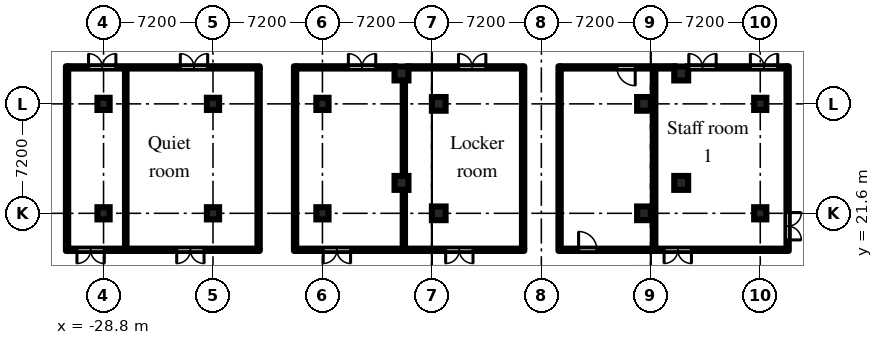
"""IFC4 building model, lengths in metres.
Left out: names, types, materials, properties, quantities, classifications, styles, units other than length and angle.
Written with IfcOpenShell. Run it as: python <this file> out.ifc"""

import sys

from ifc_helpers import new_model, si_unit, direction, frame, frame_2d, origin, origin_2d, place, context, subcontext, project, spatial, rectangle, hollow_circle, extrude, element, fill, save


model = new_model("IFC4")
c1 = context("Model", 3, precision=1e-05, world=origin(), true_north=direction((0.0, 1.0)))
c2 = subcontext(c1, "Body", "Model", "MODEL_VIEW")
j1 = project(units=[si_unit("LENGTHUNIT", "METRE"), si_unit("PLANEANGLEUNIT", "RADIAN")], contexts=[c1])
p1 = place(None, origin())
s1 = spatial("IfcSite", under=j1, at=p1, CompositionType="ELEMENT")
p2 = place(p1, origin())
s2 = spatial("IfcBuilding", under=s1, at=p2, CompositionType="ELEMENT")
p3 = place(p2, origin())
s3 = spatial("IfcBuildingStorey", under=s2, at=p3, CompositionType="ELEMENT", Elevation=0.0)
for number, where, z_axis, x_axis in (
    (1, (-6.75, 21.6, 0.0), (0.0, 0.0, 1.0), (1.0, 0.0, 0.0)),
    (2, (-6.75, 28.8, 0.0), (0.0, 0.0, 1.0), (1.0, 0.0, 0.0)),
    (3, (6.75, 21.6, 0.0), (0.0, 0.0, 1.0), (1.0, 0.0, 0.0)),
    (4, (6.75, 28.8, 0.0), (0.0, 0.0, 1.0), (1.0, 0.0, 0.0)),
):
    element("IfcColumn", number, at=place(p3, frame(where, z_axis=z_axis, x_axis=x_axis)), inside=s3, PredefinedType="COLUMN", context=c2, shape_type="SweptSolid", body=[
        extrude(rectangle(XDim=0.9, YDim=0.9, at=origin_2d()), origin(), (0.0, 0.0, 1.0), 7.2),
    ])
for number, where, z_axis, x_axis in (
    (5, (-28.8, 21.6, 0.0), (0.0, 0.0, 1.0), (1.0, 0.0, 0.0)),
    (6, (-28.8, 28.8, 0.0), (0.0, 0.0, 1.0), (1.0, 0.0, 0.0)),
    (7, (-21.6, 21.6, 0.0), (0.0, 0.0, 1.0), (1.0, 0.0, 0.0)),
    (8, (-21.6, 28.8, 0.0), (0.0, 0.0, 1.0), (1.0, 0.0, 0.0)),
    (9, (-14.4, 21.6, 0.0), (0.0, 0.0, 1.0), (1.0, 0.0, 0.0)),
    (10, (-14.4, 28.8, 0.0), (0.0, 0.0, 1.0), (1.0, 0.0, 0.0)),
    (11, (14.4, 21.6, 0.0), (0.0, 0.0, 1.0), (1.0, 0.0, 0.0)),
    (12, (14.4, 28.8, 0.0), (0.0, 0.0, 1.0), (1.0, 0.0, 0.0)),
):
    element("IfcColumn", number, at=place(p3, frame(where, z_axis=z_axis, x_axis=x_axis)), inside=s3, PredefinedType="COLUMN", context=c2, shape_type="SweptSolid", body=[
        extrude(rectangle(XDim=0.8, YDim=0.8, at=origin_2d()), origin(), (0.0, 0.0, 1.0), 6.6),
    ])
for number, where, z_axis, x_axis in (
    (13, (9.2, 23.6, 0.0), (0.0, 0.0, 1.0), (1.0, 0.0, 0.0)),
    (14, (9.2, 30.8, 0.0), (0.0, 0.0, 1.0), (1.0, 0.0, 0.0)),
    (15, (-9.2, 30.8, 0.0), (0.0, 0.0, 1.0), (1.0, 0.0, 0.0)),
    (16, (-9.2, 23.6, 0.0), (0.0, 0.0, 1.0), (1.0, 0.0, 0.0)),
):
    element("IfcColumn", number, at=place(p3, frame(where, z_axis=z_axis, x_axis=x_axis)), inside=s3, PredefinedType="COLUMN", context=c2, shape_type="SweptSolid", body=[
        extrude(hollow_circle(Radius=0.457, WallThickness=0.05, at=origin_2d()), origin(), (0.0, 0.0, 1.0), 7.5),
    ])
p4 = place(p3, frame((-31.2, 19.125, 0.0), z_axis=(0.0, 0.0, 1.0), x_axis=(0.0, 1.0, 0.0)))
e17 = element("IfcWall", 17, at=p4, inside=s3, PredefinedType="PARTITIONING", context=c2, shape_type="SweptSolid", body=[
    extrude(rectangle(XDim=12.15, YDim=0.15, at=frame_2d((6.075, 0.0))), origin(), (0.0, 0.0, 1.0), 6.6),
])
p5 = place(p3, frame((-31.125, 19.2, 0.0), z_axis=(0.0, 0.0, 1.0), x_axis=(1.0, 0.0, 0.0)))
e18 = element("IfcWall", 18, at=p5, inside=s3, PredefinedType="PARTITIONING", context=c2, shape_type="SweptSolid", body=[
    extrude(rectangle(XDim=12.6, YDim=0.15, at=frame_2d((6.3, 0.0))), origin(), (0.0, 0.0, 1.0), 6.6),
])
p6 = place(p5, frame((0.575, 0.0, 0.0)))
e19 = element("IfcOpeningElement", 19, at=p6, cuts=e18, PredefinedType="OPENING", context=c2, shape_type="SweptSolid", body=[
    extrude(rectangle(XDim=1.8, YDim=2.1, at=frame_2d((0.9, 1.05))), frame((0.0, 0.085, 0.0), z_axis=(0.0, -1.0, 0.0), x_axis=(1.0, 0.0, 0.0)), (0.0, 0.0, 1.0), 0.17),
])
p7 = place(p5, frame((7.137, 0.0, 0.0)))
e20 = element("IfcOpeningElement", 20, at=p7, cuts=e18, PredefinedType="OPENING", context=c2, shape_type="SweptSolid", body=[
    extrude(rectangle(XDim=1.8, YDim=2.1, at=frame_2d((0.9, 1.05))), frame((0.0, 0.085, 0.0), z_axis=(0.0, -1.0, 0.0), x_axis=(1.0, 0.0, 0.0)), (0.0, 0.0, 1.0), 0.17),
])
p8 = place(p3, frame((-31.125, 31.2, 0.0), z_axis=(0.0, 0.0, 1.0), x_axis=(1.0, 0.0, 0.0)))
e21 = element("IfcWall", 21, at=p8, inside=s3, PredefinedType="PARTITIONING", context=c2, shape_type="SweptSolid", body=[
    extrude(rectangle(XDim=12.6, YDim=0.15, at=frame_2d((6.3, 0.0))), origin(), (0.0, 0.0, 1.0), 6.6),
])
p9 = place(p8, frame((1.337, 0.0, 0.0)))
e22 = element("IfcOpeningElement", 22, at=p9, cuts=e21, PredefinedType="OPENING", context=c2, shape_type="SweptSolid", body=[
    extrude(rectangle(XDim=1.8, YDim=2.1, at=frame_2d((0.9, 1.05))), frame((0.0, 0.085, 0.0), z_axis=(0.0, -1.0, 0.0), x_axis=(1.0, 0.0, 0.0)), (0.0, 0.0, 1.0), 0.17),
])
p10 = place(p8, frame((7.375, 0.0, 0.0)))
e23 = element("IfcOpeningElement", 23, at=p10, cuts=e21, PredefinedType="OPENING", context=c2, shape_type="SweptSolid", body=[
    extrude(rectangle(XDim=1.8, YDim=2.1, at=frame_2d((0.9, 1.05))), frame((0.0, 0.085, 0.0), z_axis=(0.0, -1.0, 0.0), x_axis=(1.0, 0.0, 0.0)), (0.0, 0.0, 1.0), 0.17),
])
p11 = place(p3, frame((-27.338, 19.275, 0.0), z_axis=(0.0, 0.0, 1.0), x_axis=(0.0, 1.0, 0.0)))
e24 = element("IfcWall", 24, at=p11, inside=s3, PredefinedType="PARTITIONING", context=c2, shape_type="SweptSolid", body=[
    extrude(rectangle(XDim=11.85, YDim=0.1, at=frame_2d((5.925, 0.0))), origin(), (0.0, 0.0, 1.0), 6.6),
])
p12 = place(p3, frame((-18.6, 19.275, 0.0), z_axis=(0.0, 0.0, 1.0), x_axis=(0.0, 1.0, 0.0)))
e25 = element("IfcWall", 25, at=p12, inside=s3, PredefinedType="PARTITIONING", context=c2, shape_type="SweptSolid", body=[
    extrude(rectangle(XDim=11.85, YDim=0.15, at=frame_2d((5.925, 0.0))), origin(), (0.0, 0.0, 1.0), 6.6),
])
p13 = place(p3, frame((-16.2, 19.125, 0.0), z_axis=(0.0, 0.0, 1.0), x_axis=(0.0, 1.0, 0.0)))
e26 = element("IfcWall", 26, at=p13, inside=s3, PredefinedType="PARTITIONING", context=c2, shape_type="SweptSolid", body=[
    extrude(rectangle(XDim=12.15, YDim=0.15, at=frame_2d((6.075, 0.0))), origin(), (0.0, 0.0, 1.0), 6.6),
])
p14 = place(p3, frame((-16.125, 19.2, 0.0), z_axis=(0.0, 0.0, 1.0), x_axis=(1.0, 0.0, 0.0)))
e27 = element("IfcWall", 27, at=p14, inside=s3, PredefinedType="PARTITIONING", context=c2, shape_type="SweptSolid", body=[
    extrude(rectangle(XDim=15.0, YDim=0.15, at=frame_2d((7.5, 0.0))), origin(), (0.0, 0.0, 1.0), 6.6),
])
p15 = place(p14, frame((1.775, 0.0, 0.0)))
e28 = element("IfcOpeningElement", 28, at=p15, cuts=e27, PredefinedType="OPENING", context=c2, shape_type="SweptSolid", body=[
    extrude(rectangle(XDim=1.8, YDim=2.1, at=frame_2d((0.9, 1.05))), frame((0.0, 0.085, 0.0), z_axis=(0.0, -1.0, 0.0), x_axis=(1.0, 0.0, 0.0)), (0.0, 0.0, 1.0), 0.17),
])
p16 = place(p14, frame((9.83, 0.0, 0.0)))
e29 = element("IfcOpeningElement", 29, at=p16, cuts=e27, PredefinedType="OPENING", context=c2, shape_type="SweptSolid", body=[
    extrude(rectangle(XDim=1.8, YDim=2.1, at=frame_2d((0.9, 1.05))), frame((0.0, 0.085, 0.0), z_axis=(0.0, -1.0, 0.0), x_axis=(1.0, 0.0, 0.0)), (0.0, 0.0, 1.0), 0.17),
])
p17 = place(p3, frame((-16.125, 31.2, 0.0), z_axis=(0.0, 0.0, 1.0), x_axis=(1.0, 0.0, 0.0)))
e30 = element("IfcWall", 30, at=p17, inside=s3, PredefinedType="PARTITIONING", context=c2, shape_type="SweptSolid", body=[
    extrude(rectangle(XDim=6.604, YDim=0.15, at=frame_2d((3.302, 0.0))), origin(), (0.0, 0.0, 1.0), 6.6),
])
p18 = place(p17, frame((3.43, 0.0, 0.0)))
e31 = element("IfcOpeningElement", 31, at=p18, cuts=e30, PredefinedType="OPENING", context=c2, shape_type="SweptSolid", body=[
    extrude(rectangle(XDim=1.8, YDim=2.1, at=frame_2d((0.9, 1.05))), frame((0.0, 0.085, 0.0), z_axis=(0.0, -1.0, 0.0), x_axis=(1.0, 0.0, 0.0)), (0.0, 0.0, 1.0), 0.17),
])
p19 = place(p3, frame((-8.878, 31.2, 0.0), z_axis=(0.0, 0.0, 1.0), x_axis=(1.0, 0.0, 0.0)))
e32 = element("IfcWall", 32, at=p19, inside=s3, PredefinedType="PARTITIONING", context=c2, shape_type="SweptSolid", body=[
    extrude(rectangle(XDim=7.753, YDim=0.15, at=frame_2d((3.877, 0.0))), origin(), (0.0, 0.0, 1.0), 6.6),
])
p20 = place(p19, frame((3.428, 0.0, 0.0)))
e33 = element("IfcOpeningElement", 33, at=p20, cuts=e32, PredefinedType="OPENING", context=c2, shape_type="SweptSolid", body=[
    extrude(rectangle(XDim=1.8, YDim=2.1, at=frame_2d((0.9, 1.05))), frame((0.0, 0.085, 0.0), z_axis=(0.0, -1.0, 0.0), x_axis=(1.0, 0.0, 0.0)), (0.0, 0.0, 1.0), 0.17),
])
p21 = place(p3, frame((-9.045, 19.275, 0.0), z_axis=(0.0, 0.0, 1.0), x_axis=(0.0, 1.0, 0.0)))
e34 = element("IfcWall", 34, at=p21, inside=s3, PredefinedType="PARTITIONING", context=c2, shape_type="SweptSolid", body=[
    extrude(rectangle(XDim=3.875, YDim=0.15, at=frame_2d((1.938, 0.0))), origin(), (0.0, 0.0, 1.0), 6.6),
])
p22 = place(p3, frame((-9.045, 24.05, 0.0), z_axis=(0.0, 0.0, 1.0), x_axis=(0.0, 1.0, 0.0)))
e35 = element("IfcWall", 35, at=p22, inside=s3, PredefinedType="PARTITIONING", context=c2, shape_type="SweptSolid", body=[
    extrude(rectangle(XDim=6.3, YDim=0.15, at=frame_2d((3.15, 0.0))), origin(), (0.0, 0.0, 1.0), 6.6),
])
p23 = place(p3, frame((-1.2, 19.275, 0.0), z_axis=(0.0, 0.0, 1.0), x_axis=(0.0, 1.0, 0.0)))
e36 = element("IfcWall", 36, at=p23, inside=s3, PredefinedType="PARTITIONING", context=c2, shape_type="SweptSolid", body=[
    extrude(rectangle(XDim=11.85, YDim=0.15, at=frame_2d((5.925, 0.0))), origin(), (0.0, 0.0, 1.0), 6.6),
])
p24 = place(p3, frame((1.2, 19.125, 0.0), z_axis=(0.0, 0.0, 1.0), x_axis=(0.0, 1.0, 0.0)))
e37 = element("IfcWall", 37, at=p24, inside=s3, PredefinedType="PARTITIONING", context=c2, shape_type="SweptSolid", body=[
    extrude(rectangle(XDim=12.15, YDim=0.15, at=frame_2d((6.075, 0.0))), origin(), (0.0, 0.0, 1.0), 6.6),
])
p25 = place(p3, frame((1.275, 19.2, 0.0), z_axis=(0.0, 0.0, 1.0), x_axis=(1.0, 0.0, 0.0)))
e38 = element("IfcWall", 38, at=p25, inside=s3, PredefinedType="PARTITIONING", context=c2, shape_type="SweptSolid", body=[
    extrude(rectangle(XDim=14.85, YDim=0.15, at=frame_2d((7.425, 0.0))), origin(), (0.0, 0.0, 1.0), 6.6),
])
p26 = place(p25, frame((1.175, 0.0, 0.0)))
e39 = element("IfcOpeningElement", 39, at=p26, cuts=e38, PredefinedType="OPENING", context=c2, shape_type="SweptSolid", body=[
    extrude(rectangle(XDim=1.2, YDim=2.1, at=frame_2d((0.6, 1.05))), frame((0.0, 0.085, 0.0), z_axis=(0.0, -1.0, 0.0), x_axis=(1.0, 0.0, 0.0)), (0.0, 0.0, 1.0), 0.17),
])
p27 = place(p25, frame((6.8, 0.0, 0.0)))
e40 = element("IfcOpeningElement", 40, at=p27, cuts=e38, PredefinedType="OPENING", context=c2, shape_type="SweptSolid", body=[
    extrude(rectangle(XDim=1.8, YDim=2.1, at=frame_2d((0.9, 1.05))), frame((0.0, 0.085, 0.0), z_axis=(0.0, -1.0, 0.0), x_axis=(1.0, 0.0, 0.0)), (0.0, 0.0, 1.0), 0.17),
])
p28 = place(p3, frame((1.275, 31.2, 0.0), z_axis=(0.0, 0.0, 1.0), x_axis=(1.0, 0.0, 0.0)))
e41 = element("IfcWall", 41, at=p28, inside=s3, PredefinedType="PARTITIONING", context=c2, shape_type="SweptSolid", body=[
    extrude(rectangle(XDim=7.604, YDim=0.15, at=frame_2d((3.802, 0.0))), origin(), (0.0, 0.0, 1.0), 6.6),
])
p29 = place(p28, frame((3.7, 0.0, 0.0)))
e42 = element("IfcOpeningElement", 42, at=p29, cuts=e41, PredefinedType="OPENING", context=c2, shape_type="SweptSolid", body=[
    extrude(rectangle(XDim=1.2, YDim=2.1, at=frame_2d((0.6, 1.05))), frame((0.0, 0.085, 0.0), z_axis=(0.0, -1.0, 0.0), x_axis=(1.0, 0.0, 0.0)), (0.0, 0.0, 1.0), 0.17),
])
p30 = place(p3, frame((9.521, 31.2, 0.0), z_axis=(0.0, 0.0, 1.0), x_axis=(1.0, 0.0, 0.0)))
e43 = element("IfcWall", 43, at=p30, inside=s3, PredefinedType="PARTITIONING", context=c2, shape_type="SweptSolid", body=[
    extrude(rectangle(XDim=6.604, YDim=0.15, at=frame_2d((3.302, 0.0))), origin(), (0.0, 0.0, 1.0), 6.6),
])
p31 = place(p30, frame((0.178, 0.0, 0.0)))
e44 = element("IfcOpeningElement", 44, at=p31, cuts=e43, PredefinedType="OPENING", context=c2, shape_type="SweptSolid", body=[
    extrude(rectangle(XDim=1.8, YDim=2.1, at=frame_2d((0.9, 1.05))), frame((0.0, 0.085, 0.0), z_axis=(0.0, -1.0, 0.0), x_axis=(1.0, 0.0, 0.0)), (0.0, 0.0, 1.0), 0.17),
])
p32 = place(p30, frame((4.229, 0.0, 0.0)))
e45 = element("IfcOpeningElement", 45, at=p32, cuts=e43, PredefinedType="OPENING", context=c2, shape_type="SweptSolid", body=[
    extrude(rectangle(XDim=1.8, YDim=2.1, at=frame_2d((0.9, 1.05))), frame((0.0, 0.085, 0.0), z_axis=(0.0, -1.0, 0.0), x_axis=(1.0, 0.0, 0.0)), (0.0, 0.0, 1.0), 0.17),
])
p33 = place(p3, frame((7.425, 19.275, 0.0), z_axis=(0.0, 0.0, 1.0), x_axis=(0.0, 1.0, 0.0)))
e46 = element("IfcWall", 46, at=p33, inside=s3, PredefinedType="PARTITIONING", context=c2, shape_type="SweptSolid", body=[
    extrude(rectangle(XDim=11.85, YDim=0.15, at=frame_2d((5.925, 0.0))), origin(), (0.0, 0.0, 1.0), 6.6),
])
p34 = place(p3, frame((16.2, 19.125, 0.0), z_axis=(0.0, 0.0, 1.0), x_axis=(0.0, 1.0, 0.0)))
e47 = element("IfcWall", 47, at=p34, inside=s3, PredefinedType="PARTITIONING", context=c2, shape_type="SweptSolid", body=[
    extrude(rectangle(XDim=12.15, YDim=0.15, at=frame_2d((6.075, 0.0))), origin(), (0.0, 0.0, 1.0), 6.6),
])
p35 = place(p34, frame((0.725, 0.0, 0.0)))
e48 = element("IfcOpeningElement", 48, at=p35, cuts=e47, PredefinedType="OPENING", context=c2, shape_type="SweptSolid", body=[
    extrude(rectangle(XDim=1.8, YDim=2.1, at=frame_2d((0.9, 1.05))), frame((0.0, 0.085, 0.0), z_axis=(0.0, -1.0, 0.0), x_axis=(1.0, 0.0, 0.0)), (0.0, 0.0, 1.0), 0.17),
])
p36 = place(p26, origin())
e49 = element("IfcDoor", 49, at=p36, inside=s3, OperationType="SINGLE_SWING_LEFT", PredefinedType="DOOR", context=c2, shape_type="SweptSolid", body=[
    extrude(rectangle(XDim=1.2, YDim=2.1, at=frame_2d((0.6, 1.05))), frame((0.0, 0.025, 0.0), z_axis=(0.0, -1.0, 0.0), x_axis=(1.0, 0.0, 0.0)), (0.0, 0.0, 1.0), 0.05),
])
fill(e39, e49)
p37 = place(p29, frame((1.2, 0.0, 0.0), z_axis=(0.0, 0.0, 1.0), x_axis=(-1.0, 0.0, 0.0)))
e50 = element("IfcDoor", 50, at=p37, inside=s3, OperationType="SINGLE_SWING_LEFT", PredefinedType="DOOR", context=c2, shape_type="SweptSolid", body=[
    extrude(rectangle(XDim=1.2, YDim=2.1, at=frame_2d((0.6, 1.05))), frame((0.0, 0.025, 0.0), z_axis=(0.0, -1.0, 0.0), x_axis=(1.0, 0.0, 0.0)), (0.0, 0.0, 1.0), 0.05),
])
fill(e42, e50)
p38 = place(p27, frame((1.8, 0.0, 0.0), z_axis=(0.0, 0.0, 1.0), x_axis=(-1.0, 0.0, 0.0)))
e51 = element("IfcDoor", 51, at=p38, inside=s3, OperationType="DOUBLE_DOOR_DOUBLE_SWING", PredefinedType="DOOR", context=c2, shape_type="SweptSolid", body=[
    extrude(rectangle(XDim=1.8, YDim=2.1, at=frame_2d((0.9, 1.05))), frame((0.0, 0.025, 0.0), z_axis=(0.0, -1.0, 0.0), x_axis=(1.0, 0.0, 0.0)), (0.0, 0.0, 1.0), 0.05),
])
fill(e40, e51)
p39 = place(p31, origin())
e52 = element("IfcDoor", 52, at=p39, inside=s3, OperationType="DOUBLE_DOOR_DOUBLE_SWING", PredefinedType="DOOR", context=c2, shape_type="SweptSolid", body=[
    extrude(rectangle(XDim=1.8, YDim=2.1, at=frame_2d((0.9, 1.05))), frame((0.0, 0.025, 0.0), z_axis=(0.0, -1.0, 0.0), x_axis=(1.0, 0.0, 0.0)), (0.0, 0.0, 1.0), 0.05),
])
fill(e44, e52)
p40 = place(p32, origin())
e53 = element("IfcDoor", 53, at=p40, inside=s3, OperationType="DOUBLE_DOOR_DOUBLE_SWING", PredefinedType="DOOR", context=c2, shape_type="SweptSolid", body=[
    extrude(rectangle(XDim=1.8, YDim=2.1, at=frame_2d((0.9, 1.05))), frame((0.0, 0.025, 0.0), z_axis=(0.0, -1.0, 0.0), x_axis=(1.0, 0.0, 0.0)), (0.0, 0.0, 1.0), 0.05),
])
fill(e45, e53)
p41 = place(p35, frame((1.8, 0.0, 0.0), z_axis=(0.0, 0.0, 1.0), x_axis=(-1.0, 0.0, 0.0)))
e54 = element("IfcDoor", 54, at=p41, inside=s3, OperationType="DOUBLE_DOOR_DOUBLE_SWING", PredefinedType="DOOR", context=c2, shape_type="SweptSolid", body=[
    extrude(rectangle(XDim=1.8, YDim=2.1, at=frame_2d((0.9, 1.05))), frame((0.0, 0.025, 0.0), z_axis=(0.0, -1.0, 0.0), x_axis=(1.0, 0.0, 0.0)), (0.0, 0.0, 1.0), 0.05),
])
fill(e48, e54)
p42 = place(p15, frame((1.8, 0.0, 0.0), z_axis=(0.0, 0.0, 1.0), x_axis=(-1.0, 0.0, 0.0)))
e55 = element("IfcDoor", 55, at=p42, inside=s3, OperationType="DOUBLE_DOOR_DOUBLE_SWING", PredefinedType="DOOR", context=c2, shape_type="SweptSolid", body=[
    extrude(rectangle(XDim=1.8, YDim=2.1, at=frame_2d((0.9, 1.05))), frame((0.0, 0.025, 0.0), z_axis=(0.0, -1.0, 0.0), x_axis=(1.0, 0.0, 0.0)), (0.0, 0.0, 1.0), 0.05),
])
fill(e28, e55)
p43 = place(p18, origin())
e56 = element("IfcDoor", 56, at=p43, inside=s3, OperationType="DOUBLE_DOOR_DOUBLE_SWING", PredefinedType="DOOR", context=c2, shape_type="SweptSolid", body=[
    extrude(rectangle(XDim=1.8, YDim=2.1, at=frame_2d((0.9, 1.05))), frame((0.0, 0.025, 0.0), z_axis=(0.0, -1.0, 0.0), x_axis=(1.0, 0.0, 0.0)), (0.0, 0.0, 1.0), 0.05),
])
fill(e31, e56)
p44 = place(p16, frame((1.8, 0.0, 0.0), z_axis=(0.0, 0.0, 1.0), x_axis=(-1.0, 0.0, 0.0)))
e57 = element("IfcDoor", 57, at=p44, inside=s3, OperationType="DOUBLE_DOOR_DOUBLE_SWING", PredefinedType="DOOR", context=c2, shape_type="SweptSolid", body=[
    extrude(rectangle(XDim=1.8, YDim=2.1, at=frame_2d((0.9, 1.05))), frame((0.0, 0.025, 0.0), z_axis=(0.0, -1.0, 0.0), x_axis=(1.0, 0.0, 0.0)), (0.0, 0.0, 1.0), 0.05),
])
fill(e29, e57)
p45 = place(p20, origin())
e58 = element("IfcDoor", 58, at=p45, inside=s3, OperationType="DOUBLE_DOOR_DOUBLE_SWING", PredefinedType="DOOR", context=c2, shape_type="SweptSolid", body=[
    extrude(rectangle(XDim=1.8, YDim=2.1, at=frame_2d((0.9, 1.05))), frame((0.0, 0.025, 0.0), z_axis=(0.0, -1.0, 0.0), x_axis=(1.0, 0.0, 0.0)), (0.0, 0.0, 1.0), 0.05),
])
fill(e33, e58)
p46 = place(p6, frame((1.8, 0.0, 0.0), z_axis=(0.0, 0.0, 1.0), x_axis=(-1.0, 0.0, 0.0)))
e59 = element("IfcDoor", 59, at=p46, inside=s3, OperationType="DOUBLE_DOOR_DOUBLE_SWING", PredefinedType="DOOR", context=c2, shape_type="SweptSolid", body=[
    extrude(rectangle(XDim=1.8, YDim=2.1, at=frame_2d((0.9, 1.05))), frame((0.0, 0.025, 0.0), z_axis=(0.0, -1.0, 0.0), x_axis=(1.0, 0.0, 0.0)), (0.0, 0.0, 1.0), 0.05),
])
fill(e19, e59)
p47 = place(p9, origin())
e60 = element("IfcDoor", 60, at=p47, inside=s3, OperationType="DOUBLE_DOOR_DOUBLE_SWING", PredefinedType="DOOR", context=c2, shape_type="SweptSolid", body=[
    extrude(rectangle(XDim=1.8, YDim=2.1, at=frame_2d((0.9, 1.05))), frame((0.0, 0.025, 0.0), z_axis=(0.0, -1.0, 0.0), x_axis=(1.0, 0.0, 0.0)), (0.0, 0.0, 1.0), 0.05),
])
fill(e22, e60)
p48 = place(p7, frame((1.8, 0.0, 0.0), z_axis=(0.0, 0.0, 1.0), x_axis=(-1.0, 0.0, 0.0)))
e61 = element("IfcDoor", 61, at=p48, inside=s3, OperationType="DOUBLE_DOOR_DOUBLE_SWING", PredefinedType="DOOR", context=c2, shape_type="SweptSolid", body=[
    extrude(rectangle(XDim=1.8, YDim=2.1, at=frame_2d((0.9, 1.05))), frame((0.0, 0.025, 0.0), z_axis=(0.0, -1.0, 0.0), x_axis=(1.0, 0.0, 0.0)), (0.0, 0.0, 1.0), 0.05),
])
fill(e20, e61)
p49 = place(p10, origin())
e62 = element("IfcDoor", 62, at=p49, inside=s3, OperationType="DOUBLE_DOOR_DOUBLE_SWING", PredefinedType="DOOR", context=c2, shape_type="SweptSolid", body=[
    extrude(rectangle(XDim=1.8, YDim=2.1, at=frame_2d((0.9, 1.05))), frame((0.0, 0.025, 0.0), z_axis=(0.0, -1.0, 0.0), x_axis=(1.0, 0.0, 0.0)), (0.0, 0.0, 1.0), 0.05),
])
fill(e23, e62)
save(model, sys.argv[1])
